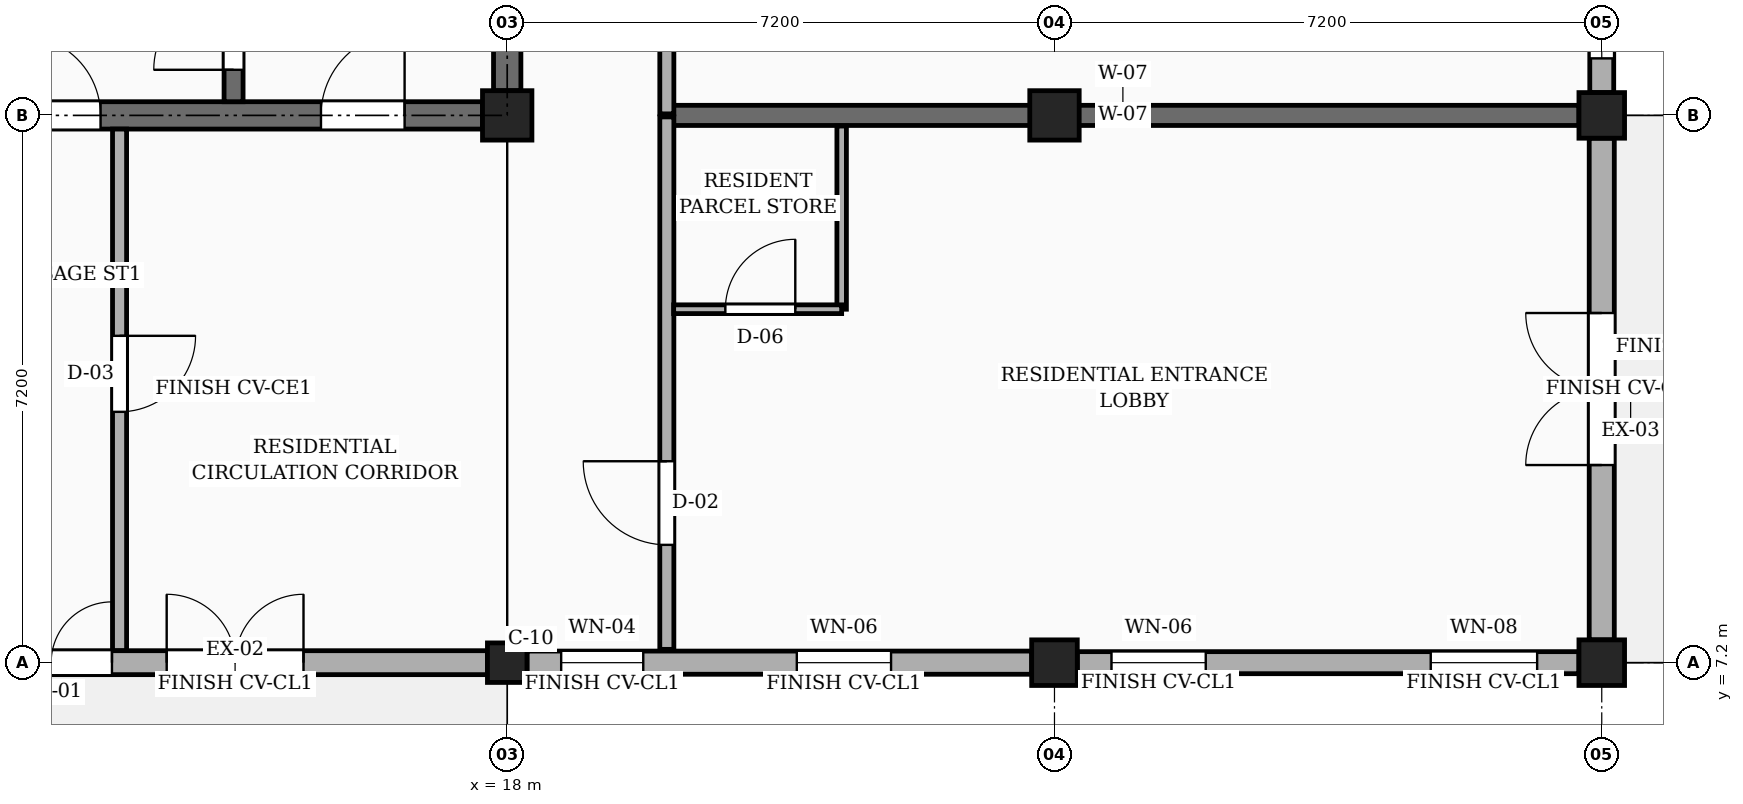
"""IFC4 building model, lengths in metres.
Left out: names, types, materials, properties, quantities, classifications, styles, units other than length and angle.
Written with IfcOpenShell. Run it as: python <this file> out.ifc"""

import sys

from ifc_helpers import new_model, si_unit, direction, frame, frame_2d, origin, origin_2d, place, context, subcontext, project, spatial, rectangle, circle, extrude, element, fill, save


model = new_model("IFC4")
c1 = context("Model", 3, precision=1e-05, world=origin(), true_north=direction((0.0, 1.0)))
c2 = subcontext(c1, "Body", "Model", "MODEL_VIEW")
j1 = project(units=[si_unit("LENGTHUNIT", "METRE"), si_unit("PLANEANGLEUNIT", "RADIAN")], contexts=[c1])
p1 = place(None, origin())
s1 = spatial("IfcSite", under=j1, at=p1, CompositionType="ELEMENT")
p2 = place(p1, origin())
s2 = spatial("IfcBuilding", under=s1, at=p2, CompositionType="ELEMENT")
p3 = place(p2, origin())
s3 = spatial("IfcBuildingStorey", under=s2, at=p3, CompositionType="ELEMENT", Elevation=0.0)
p4 = place(p3, frame((18.0, 7.2, 0.0), z_axis=(0.0, 0.0, 1.0), x_axis=(1.0, 0.0, 0.0)))
e1 = element("IfcColumn", 1, at=p4, inside=s3, PredefinedType="COLUMN", context=c2, shape_type="SweptSolid", body=[
    extrude(circle(Radius=0.26, at=origin_2d()), origin(), (0.0, 0.0, 1.0), 4.5),
])
p5 = place(p3, frame((18.0, 14.4, 0.0), z_axis=(0.0, 0.0, 1.0), x_axis=(1.0, 0.0, 0.0)))
e2 = element("IfcColumn", 2, at=p5, inside=s3, PredefinedType="COLUMN", context=c2, shape_type="SweptSolid", body=[
    extrude(rectangle(XDim=0.65, YDim=0.65, at=origin_2d()), origin(), (0.0, 0.0, 1.0), 4.5),
])
p6 = place(p3, frame((25.2, 7.2, 0.0), z_axis=(0.0, 0.0, 1.0), x_axis=(1.0, 0.0, 0.0)))
e3 = element("IfcColumn", 3, at=p6, inside=s3, PredefinedType="COLUMN", context=c2, shape_type="SweptSolid", body=[
    extrude(rectangle(XDim=0.6, YDim=0.6, at=origin_2d()), origin(), (0.0, 0.0, 1.0), 4.5),
])
p7 = place(p3, frame((25.2, 14.4, 0.0), z_axis=(0.0, 0.0, 1.0), x_axis=(1.0, 0.0, 0.0)))
e4 = element("IfcColumn", 4, at=p7, inside=s3, PredefinedType="COLUMN", context=c2, shape_type="SweptSolid", body=[
    extrude(rectangle(XDim=0.65, YDim=0.65, at=origin_2d()), origin(), (0.0, 0.0, 1.0), 4.5),
])
for number, where, z_axis, x_axis in (
    (5, (32.4, 7.2, 0.0), (0.0, 0.0, 1.0), (1.0, 0.0, 0.0)),
    (6, (32.4, 14.4, 0.0), (0.0, 0.0, 1.0), (1.0, 0.0, 0.0)),
):
    element("IfcColumn", number, at=place(p3, frame(where, z_axis=z_axis, x_axis=x_axis)), inside=s3, PredefinedType="COLUMN", context=c2, shape_type="SweptSolid", body=[
        extrude(rectangle(XDim=0.6, YDim=0.6, at=origin_2d()), origin(), (0.0, 0.0, 1.0), 4.5),
    ])
p8 = place(p3, frame((20.1, 14.4, 0.0), z_axis=(0.0, 0.0, 1.0), x_axis=(1.0, 0.0, 0.0)))
e7 = element("IfcWall", 7, at=p8, inside=s3, PredefinedType="SOLIDWALL", context=c2, shape_type="SweptSolid", body=[
    extrude(rectangle(XDim=12.0, YDim=0.265, at=frame_2d((6.0, 0.0))), origin(), (0.0, 0.0, 1.0), 3.52),
])
p9 = place(p3, frame((11.1, 7.2, 0.0), z_axis=(0.0, 0.0, 1.0), x_axis=(1.0, 0.0, 0.0)))
e8 = element("IfcWall", 8, at=p9, inside=s3, PredefinedType="SOLIDWALL", context=c2, shape_type="SweptSolid", body=[
    extrude(rectangle(XDim=6.64, YDim=0.315, at=frame_2d((3.32, 0.0))), origin(), (0.0, 0.0, 1.0), 3.79),
])
p10 = place(p9, frame((2.42, 0.0, 0.0)))
e9 = element("IfcOpeningElement", 9, at=p10, cuts=e8, PredefinedType="OPENING", context=c2, shape_type="SweptSolid", body=[
    extrude(rectangle(XDim=1.8, YDim=2.2, at=frame_2d((0.9, 1.1))), frame((0.0, 0.167, 0.0), z_axis=(0.0, -1.0, 0.0), x_axis=(1.0, 0.0, 0.0)), (0.0, 0.0, 1.0), 0.335),
])
p11 = place(p9, frame((0.1, 0.0, 0.0)))
e10 = element("IfcOpeningElement", 10, at=p11, cuts=e8, PredefinedType="OPENING", context=c2, shape_type="SweptSolid", body=[
    extrude(rectangle(XDim=1.6, YDim=2.25, at=frame_2d((0.8, 1.125))), frame((0.0, 0.167, 0.0), z_axis=(0.0, -1.0, 0.0), x_axis=(1.0, 0.0, 0.0)), (0.0, 0.0, 1.0), 0.335),
])
p12 = place(p3, frame((18.26, 7.2, 0.0), z_axis=(0.0, 0.0, 1.0), x_axis=(1.0, 0.0, 0.0)))
e11 = element("IfcWall", 11, at=p12, inside=s3, PredefinedType="SOLIDWALL", context=c2, shape_type="SweptSolid", body=[
    extrude(rectangle(XDim=6.64, YDim=0.305, at=frame_2d((3.32, 0.0))), origin(), (0.0, 0.0, 1.0), 3.79),
])
p13 = place(p12, frame((0.45, 0.0, 0.78)))
e12 = element("IfcOpeningElement", 12, at=p13, cuts=e11, PredefinedType="OPENING", context=c2, shape_type="SweptSolid", body=[
    extrude(rectangle(XDim=1.08, YDim=1.15, at=frame_2d((0.54, 0.575))), frame((0.0, 0.163, 0.0), z_axis=(0.0, -1.0, 0.0), x_axis=(1.0, 0.0, 0.0)), (0.0, 0.0, 1.0), 0.325),
])
p14 = place(p12, frame((3.55, 0.0, 0.78)))
e13 = element("IfcOpeningElement", 13, at=p14, cuts=e11, PredefinedType="OPENING", context=c2, shape_type="SweptSolid", body=[
    extrude(rectangle(XDim=1.24, YDim=1.15, at=frame_2d((0.62, 0.575))), frame((0.0, 0.163, 0.0), z_axis=(0.0, -1.0, 0.0), x_axis=(1.0, 0.0, 0.0)), (0.0, 0.0, 1.0), 0.325),
])
p15 = place(p3, frame((25.5, 7.2, 0.0), z_axis=(0.0, 0.0, 1.0), x_axis=(1.0, 0.0, 0.0)))
e14 = element("IfcWall", 14, at=p15, inside=s3, PredefinedType="SOLIDWALL", context=c2, shape_type="SweptSolid", body=[
    extrude(rectangle(XDim=6.6, YDim=0.29, at=frame_2d((3.3, 0.0))), origin(), (0.0, 0.0, 1.0), 3.79),
])
p16 = place(p15, frame((0.45, 0.0, 0.78)))
e15 = element("IfcOpeningElement", 15, at=p16, cuts=e14, PredefinedType="OPENING", context=c2, shape_type="SweptSolid", body=[
    extrude(rectangle(XDim=1.24, YDim=1.15, at=frame_2d((0.62, 0.575))), frame((0.0, 0.155, 0.0), z_axis=(0.0, -1.0, 0.0), x_axis=(1.0, 0.0, 0.0)), (0.0, 0.0, 1.0), 0.31),
])
p17 = place(p15, frame((4.65, 0.0, 0.78)))
e16 = element("IfcOpeningElement", 16, at=p17, cuts=e14, PredefinedType="OPENING", context=c2, shape_type="SweptSolid", body=[
    extrude(rectangle(XDim=1.4, YDim=1.15, at=frame_2d((0.7, 0.575))), frame((0.0, 0.155, 0.0), z_axis=(0.0, -1.0, 0.0), x_axis=(1.0, 0.0, 0.0)), (0.0, 0.0, 1.0), 0.31),
])
p18 = place(p3, frame((32.4, 7.5, 0.0), z_axis=(0.0, 0.0, 1.0), x_axis=(0.0, 1.0, 0.0)))
e17 = element("IfcWall", 17, at=p18, inside=s3, PredefinedType="SOLIDWALL", context=c2, shape_type="SweptSolid", body=[
    extrude(rectangle(XDim=6.6, YDim=0.33, at=frame_2d((3.3, 0.0))), origin(), (0.0, 0.0, 1.0), 3.79),
])
p19 = place(p18, frame((2.3, 0.0, 0.0)))
e18 = element("IfcOpeningElement", 18, at=p19, cuts=e17, PredefinedType="OPENING", context=c2, shape_type="SweptSolid", body=[
    extrude(rectangle(XDim=2.0, YDim=2.3, at=frame_2d((1.0, 1.15))), frame((0.0, 0.175, 0.0), z_axis=(0.0, -1.0, 0.0), x_axis=(1.0, 0.0, 0.0)), (0.0, 0.0, 1.0), 0.35),
])
p20 = place(p3, frame((32.4, 14.7, 0.0), z_axis=(0.0, 0.0, 1.0), x_axis=(0.0, 1.0, 0.0)))
e19 = element("IfcWall", 19, at=p20, inside=s3, PredefinedType="SOLIDWALL", context=c2, shape_type="SweptSolid", body=[
    extrude(rectangle(XDim=6.64, YDim=0.315, at=frame_2d((3.32, 0.0))), origin(), (0.0, 0.0, 1.0), 3.79),
])
p21 = place(p20, frame((0.45, 0.0, 0.78)))
e20 = element("IfcOpeningElement", 20, at=p21, cuts=e19, PredefinedType="OPENING", context=c2, shape_type="SweptSolid", body=[
    extrude(rectangle(XDim=1.4, YDim=1.15, at=frame_2d((0.7, 0.575))), frame((0.0, 0.167, 0.0), z_axis=(0.0, -1.0, 0.0), x_axis=(1.0, 0.0, 0.0)), (0.0, 0.0, 1.0), 0.335),
])
p22 = place(p20, frame((4.65, 0.0, 0.78)))
e21 = element("IfcOpeningElement", 21, at=p22, cuts=e19, PredefinedType="OPENING", context=c2, shape_type="SweptSolid", body=[
    extrude(rectangle(XDim=0.96, YDim=1.26, at=frame_2d((0.48, 0.63))), frame((0.0, 0.167, 0.0), z_axis=(0.0, -1.0, 0.0), x_axis=(1.0, 0.0, 0.0)), (0.0, 0.0, 1.0), 0.335),
])
p23 = place(p3, frame((18.0, 14.725, 0.0), z_axis=(0.0, 0.0, 1.0), x_axis=(0.0, 1.0, 0.0)))
e22 = element("IfcWall", 22, at=p23, inside=s3, PredefinedType="SHEAR", context=c2, shape_type="SweptSolid", body=[
    extrude(rectangle(XDim=6.55, YDim=0.36, at=frame_2d((3.275, 0.0))), origin(), (0.0, 0.0, 1.0), 4.22),
])
p24 = place(p23, frame((1.5, 0.0, 0.0)))
e23 = element("IfcOpeningElement", 23, at=p24, cuts=e22, PredefinedType="OPENING", context=c2, shape_type="SweptSolid", body=[
    extrude(rectangle(XDim=1.1, YDim=2.15, at=frame_2d((0.55, 1.075))), frame((0.0, 0.19, 0.0), z_axis=(0.0, -1.0, 0.0), x_axis=(1.0, 0.0, 0.0)), (0.0, 0.0, 1.0), 0.38),
])
p25 = place(p3, frame((11.125, 14.4, 0.0), z_axis=(0.0, 0.0, 1.0), x_axis=(1.0, 0.0, 0.0)))
e24 = element("IfcWall", 24, at=p25, inside=s3, PredefinedType="SHEAR", context=c2, shape_type="SweptSolid", body=[
    extrude(rectangle(XDim=6.55, YDim=0.36, at=frame_2d((3.275, 0.0))), origin(), (0.0, 0.0, 1.0), 4.22),
])
p26 = place(p25, frame((4.425, 0.0, 0.0)))
e25 = element("IfcOpeningElement", 25, at=p26, cuts=e24, PredefinedType="OPENING", context=c2, shape_type="SweptSolid", body=[
    extrude(rectangle(XDim=1.1, YDim=2.15, at=frame_2d((0.55, 1.075))), frame((0.0, 0.19, 0.0), z_axis=(0.0, -1.0, 0.0), x_axis=(1.0, 0.0, 0.0)), (0.0, 0.0, 1.0), 0.38),
])
p27 = place(p25, frame((0.475, 0.0, 0.0)))
e26 = element("IfcOpeningElement", 26, at=p27, cuts=e24, PredefinedType="OPENING", context=c2, shape_type="SweptSolid", body=[
    extrude(rectangle(XDim=1.05, YDim=2.15, at=frame_2d((0.525, 1.075))), frame((0.0, 0.19, 0.0), z_axis=(0.0, -1.0, 0.0), x_axis=(1.0, 0.0, 0.0)), (0.0, 0.0, 1.0), 0.38),
])
p28 = place(p3, frame((14.4, 14.58, 0.0), z_axis=(0.0, 0.0, 1.0), x_axis=(0.0, 1.0, 0.0)))
e27 = element("IfcWall", 27, at=p28, inside=s3, PredefinedType="SHEAR", context=c2, shape_type="SweptSolid", body=[
    extrude(rectangle(XDim=6.84, YDim=0.25, at=frame_2d((3.42, 0.0))), origin(), (0.0, 0.0, 1.0), 4.22),
])
p29 = place(p28, frame((0.42, 0.0, 0.0)))
e28 = element("IfcOpeningElement", 28, at=p29, cuts=e27, PredefinedType="OPENING", context=c2, shape_type="SweptSolid", body=[
    extrude(rectangle(XDim=1.05, YDim=2.15, at=frame_2d((0.525, 1.075))), frame((0.0, 0.135, 0.0), z_axis=(0.0, -1.0, 0.0), x_axis=(1.0, 0.0, 0.0)), (0.0, 0.0, 1.0), 0.27),
])
p30 = place(p3, frame((20.1, 7.375, 0.0), z_axis=(0.0, 0.0, 1.0), x_axis=(0.0, 1.0, 0.0)))
e29 = element("IfcWall", 29, at=p30, inside=s3, PredefinedType="PARTITIONING", context=c2, shape_type="SweptSolid", body=[
    extrude(rectangle(XDim=7.005, YDim=0.185, at=frame_2d((3.502, 0.0))), origin(), (0.0, 0.0, 1.0), 3.655),
])
p31 = place(p30, frame((1.375, 0.0, 0.0)))
e30 = element("IfcOpeningElement", 30, at=p31, cuts=e29, PredefinedType="OPENING", context=c2, shape_type="SweptSolid", body=[
    extrude(rectangle(XDim=1.1, YDim=2.15, at=frame_2d((0.55, 1.075))), frame((0.0, 0.103, 0.0), z_axis=(0.0, -1.0, 0.0), x_axis=(1.0, 0.0, 0.0)), (0.0, 0.0, 1.0), 0.205),
])
p32 = place(p3, frame((20.1, 14.42, 0.0), z_axis=(0.0, 0.0, 1.0), x_axis=(0.0, 1.0, 0.0)))
e31 = element("IfcWall", 31, at=p32, inside=s3, PredefinedType="PARTITIONING", context=c2, shape_type="SweptSolid", body=[
    extrude(rectangle(XDim=7.16, YDim=0.185, at=frame_2d((3.58, 0.0))), origin(), (0.0, 0.0, 1.0), 3.655),
])
p33 = place(p32, frame((1.78, 0.0, 0.0)))
e32 = element("IfcOpeningElement", 32, at=p33, cuts=e31, PredefinedType="OPENING", context=c2, shape_type="SweptSolid", body=[
    extrude(rectangle(XDim=1.1, YDim=2.15, at=frame_2d((0.55, 1.075))), frame((0.0, 0.103, 0.0), z_axis=(0.0, -1.0, 0.0), x_axis=(1.0, 0.0, 0.0)), (0.0, 0.0, 1.0), 0.205),
])
p34 = place(p3, frame((22.4, 11.85, 0.0), z_axis=(0.0, 0.0, 1.0), x_axis=(0.0, 1.0, 0.0)))
e33 = element("IfcWall", 33, at=p34, inside=s3, PredefinedType="PARTITIONING", context=c2, shape_type="SweptSolid", body=[
    extrude(rectangle(XDim=2.41, YDim=0.125, at=frame_2d((1.205, 0.0))), origin(), (0.0, 0.0, 1.0), 3.655),
])
p35 = place(p3, frame((20.19, 11.85, 0.0), z_axis=(0.0, 0.0, 1.0), x_axis=(1.0, 0.0, 0.0)))
e34 = element("IfcWall", 34, at=p35, inside=s3, PredefinedType="PARTITIONING", context=c2, shape_type="SweptSolid", body=[
    extrude(rectangle(XDim=2.21, YDim=0.115, at=frame_2d((1.105, 0.0))), origin(), (0.0, 0.0, 1.0), 3.655),
])
p36 = place(p35, frame((0.68, 0.0, 0.0)))
e35 = element("IfcOpeningElement", 35, at=p36, cuts=e34, PredefinedType="OPENING", context=c2, shape_type="SweptSolid", body=[
    extrude(rectangle(XDim=0.92, YDim=2.1, at=frame_2d((0.46, 1.05))), frame((0.0, 0.067, 0.0), z_axis=(0.0, -1.0, 0.0), x_axis=(1.0, 0.0, 0.0)), (0.0, 0.0, 1.0), 0.135),
])
p37 = place(p3, frame((12.9, 14.22, 0.0), z_axis=(0.0, 0.0, 1.0), x_axis=(0.0, -1.0, 0.0)))
e36 = element("IfcWall", 36, at=p37, inside=s3, PredefinedType="PARTITIONING", context=c2, shape_type="SweptSolid", body=[
    extrude(rectangle(XDim=6.86, YDim=0.185, at=frame_2d((3.43, 0.0))), origin(), (0.0, 0.0, 1.0), 3.655),
])
p38 = place(p37, frame((2.72, 0.0, 0.0)))
e37 = element("IfcOpeningElement", 37, at=p38, cuts=e36, PredefinedType="OPENING", context=c2, shape_type="SweptSolid", body=[
    extrude(rectangle(XDim=1.0, YDim=2.15, at=frame_2d((0.5, 1.075))), frame((0.0, 0.103, 0.0), z_axis=(0.0, -1.0, 0.0), x_axis=(1.0, 0.0, 0.0)), (0.0, 0.0, 1.0), 0.205),
])
p39 = place(p10, frame((1.8, 0.0, 0.0), z_axis=(0.0, 0.0, 1.0), x_axis=(-1.0, 0.0, 0.0)))
e38 = element("IfcDoor", 38, at=p39, inside=s3, OperationType="DOUBLE_DOOR_SINGLE_SWING", PredefinedType="DOOR", context=c2, shape_type="SweptSolid", body=[
    extrude(rectangle(XDim=1.8, YDim=2.2, at=frame_2d((0.9, 1.1))), frame((0.0, 0.025, 0.0), z_axis=(0.0, -1.0, 0.0), x_axis=(1.0, 0.0, 0.0)), (0.0, 0.0, 1.0), 0.05),
])
fill(e9, e38)
p40 = place(p13, origin())
e39 = element("IfcWindow", 39, at=p40, inside=s3, PartitioningType="SINGLE_PANEL", PredefinedType="WINDOW", context=c2, shape_type="SweptSolid", body=[
    extrude(rectangle(XDim=1.08, YDim=1.15, at=frame_2d((0.54, 0.575))), frame((0.0, 0.03, 0.0), z_axis=(0.0, -1.0, 0.0), x_axis=(1.0, 0.0, 0.0)), (0.0, 0.0, 1.0), 0.06),
])
fill(e12, e39)
p41 = place(p14, origin())
e40 = element("IfcWindow", 40, at=p41, inside=s3, PartitioningType="SINGLE_PANEL", PredefinedType="WINDOW", context=c2, shape_type="SweptSolid", body=[
    extrude(rectangle(XDim=1.24, YDim=1.15, at=frame_2d((0.62, 0.575))), frame((0.0, 0.03, 0.0), z_axis=(0.0, -1.0, 0.0), x_axis=(1.0, 0.0, 0.0)), (0.0, 0.0, 1.0), 0.06),
])
fill(e13, e40)
p42 = place(p16, origin())
e41 = element("IfcWindow", 41, at=p42, inside=s3, PartitioningType="SINGLE_PANEL", PredefinedType="WINDOW", context=c2, shape_type="SweptSolid", body=[
    extrude(rectangle(XDim=1.24, YDim=1.15, at=frame_2d((0.62, 0.575))), frame((0.0, 0.03, 0.0), z_axis=(0.0, -1.0, 0.0), x_axis=(1.0, 0.0, 0.0)), (0.0, 0.0, 1.0), 0.06),
])
fill(e15, e41)
p43 = place(p17, origin())
e42 = element("IfcWindow", 42, at=p43, inside=s3, PartitioningType="SINGLE_PANEL", PredefinedType="WINDOW", context=c2, shape_type="SweptSolid", body=[
    extrude(rectangle(XDim=1.4, YDim=1.15, at=frame_2d((0.7, 0.575))), frame((0.0, 0.03, 0.0), z_axis=(0.0, -1.0, 0.0), x_axis=(1.0, 0.0, 0.0)), (0.0, 0.0, 1.0), 0.06),
])
fill(e16, e42)
p44 = place(p19, frame((2.0, 0.0, 0.0), z_axis=(0.0, 0.0, 1.0), x_axis=(-1.0, 0.0, 0.0)))
e43 = element("IfcDoor", 43, at=p44, inside=s3, OperationType="DOUBLE_DOOR_SINGLE_SWING", PredefinedType="DOOR", context=c2, shape_type="SweptSolid", body=[
    extrude(rectangle(XDim=2.0, YDim=2.3, at=frame_2d((1.0, 1.15))), frame((0.0, 0.025, 0.0), z_axis=(0.0, -1.0, 0.0), x_axis=(1.0, 0.0, 0.0)), (0.0, 0.0, 1.0), 0.05),
])
fill(e18, e43)
p45 = place(p21, origin())
e44 = element("IfcWindow", 44, at=p45, inside=s3, PartitioningType="SINGLE_PANEL", PredefinedType="WINDOW", context=c2, shape_type="SweptSolid", body=[
    extrude(rectangle(XDim=1.4, YDim=1.15, at=frame_2d((0.7, 0.575))), frame((0.0, 0.03, 0.0), z_axis=(0.0, -1.0, 0.0), x_axis=(1.0, 0.0, 0.0)), (0.0, 0.0, 1.0), 0.06),
])
fill(e20, e44)
p46 = place(p26, frame((1.1, 0.0, 0.0), z_axis=(0.0, 0.0, 1.0), x_axis=(-1.0, 0.0, 0.0)))
e45 = element("IfcDoor", 45, at=p46, inside=s3, OperationType="SINGLE_SWING_RIGHT", PredefinedType="DOOR", context=c2, shape_type="SweptSolid", body=[
    extrude(rectangle(XDim=1.1, YDim=2.15, at=frame_2d((0.55, 1.075))), frame((0.0, 0.025, 0.0), z_axis=(0.0, -1.0, 0.0), x_axis=(1.0, 0.0, 0.0)), (0.0, 0.0, 1.0), 0.05),
])
fill(e25, e45)
p47 = place(p29, frame((1.05, 0.0, 0.0), z_axis=(0.0, 0.0, 1.0), x_axis=(-1.0, 0.0, 0.0)))
e46 = element("IfcDoor", 46, at=p47, inside=s3, OperationType="SINGLE_SWING_LEFT", PredefinedType="DOOR", context=c2, shape_type="SweptSolid", body=[
    extrude(rectangle(XDim=1.05, YDim=2.15, at=frame_2d((0.525, 1.075))), frame((0.0, 0.025, 0.0), z_axis=(0.0, -1.0, 0.0), x_axis=(1.0, 0.0, 0.0)), (0.0, 0.0, 1.0), 0.05),
])
fill(e28, e46)
p48 = place(p31, origin())
e47 = element("IfcDoor", 47, at=p48, inside=s3, OperationType="SINGLE_SWING_RIGHT", PredefinedType="DOOR", context=c2, shape_type="SweptSolid", body=[
    extrude(rectangle(XDim=1.1, YDim=2.15, at=frame_2d((0.55, 1.075))), frame((0.0, 0.025, 0.0), z_axis=(0.0, -1.0, 0.0), x_axis=(1.0, 0.0, 0.0)), (0.0, 0.0, 1.0), 0.05),
])
fill(e30, e47)
p49 = place(p36, origin())
e48 = element("IfcDoor", 48, at=p49, inside=s3, OperationType="SINGLE_SWING_RIGHT", PredefinedType="DOOR", context=c2, shape_type="SweptSolid", body=[
    extrude(rectangle(XDim=0.92, YDim=2.1, at=frame_2d((0.46, 1.05))), frame((0.0, 0.025, 0.0), z_axis=(0.0, -1.0, 0.0), x_axis=(1.0, 0.0, 0.0)), (0.0, 0.0, 1.0), 0.05),
])
fill(e35, e48)
p50 = place(p27, frame((1.05, 0.0, 0.0), z_axis=(0.0, 0.0, 1.0), x_axis=(-1.0, 0.0, 0.0)))
e49 = element("IfcDoor", 49, at=p50, inside=s3, OperationType="SINGLE_SWING_LEFT", PredefinedType="DOOR", context=c2, shape_type="SweptSolid", body=[
    extrude(rectangle(XDim=1.05, YDim=2.15, at=frame_2d((0.525, 1.075))), frame((0.0, 0.025, 0.0), z_axis=(0.0, -1.0, 0.0), x_axis=(1.0, 0.0, 0.0)), (0.0, 0.0, 1.0), 0.05),
])
fill(e26, e49)
p51 = place(p11, frame((1.6, 0.0, 0.0), z_axis=(0.0, 0.0, 1.0), x_axis=(-1.0, 0.0, 0.0)))
e50 = element("IfcDoor", 50, at=p51, inside=s3, OperationType="DOUBLE_DOOR_SINGLE_SWING", PredefinedType="DOOR", context=c2, shape_type="SweptSolid", body=[
    extrude(rectangle(XDim=1.6, YDim=2.25, at=frame_2d((0.8, 1.125))), frame((0.0, 0.025, 0.0), z_axis=(0.0, -1.0, 0.0), x_axis=(1.0, 0.0, 0.0)), (0.0, 0.0, 1.0), 0.05),
])
fill(e10, e50)
p52 = place(p38, origin())
e51 = element("IfcDoor", 51, at=p52, inside=s3, OperationType="SINGLE_SWING_LEFT", PredefinedType="DOOR", context=c2, shape_type="SweptSolid", body=[
    extrude(rectangle(XDim=1.0, YDim=2.15, at=frame_2d((0.5, 1.075))), frame((0.0, 0.025, 0.0), z_axis=(0.0, -1.0, 0.0), x_axis=(1.0, 0.0, 0.0)), (0.0, 0.0, 1.0), 0.05),
])
fill(e37, e51)
save(model, sys.argv[1])
